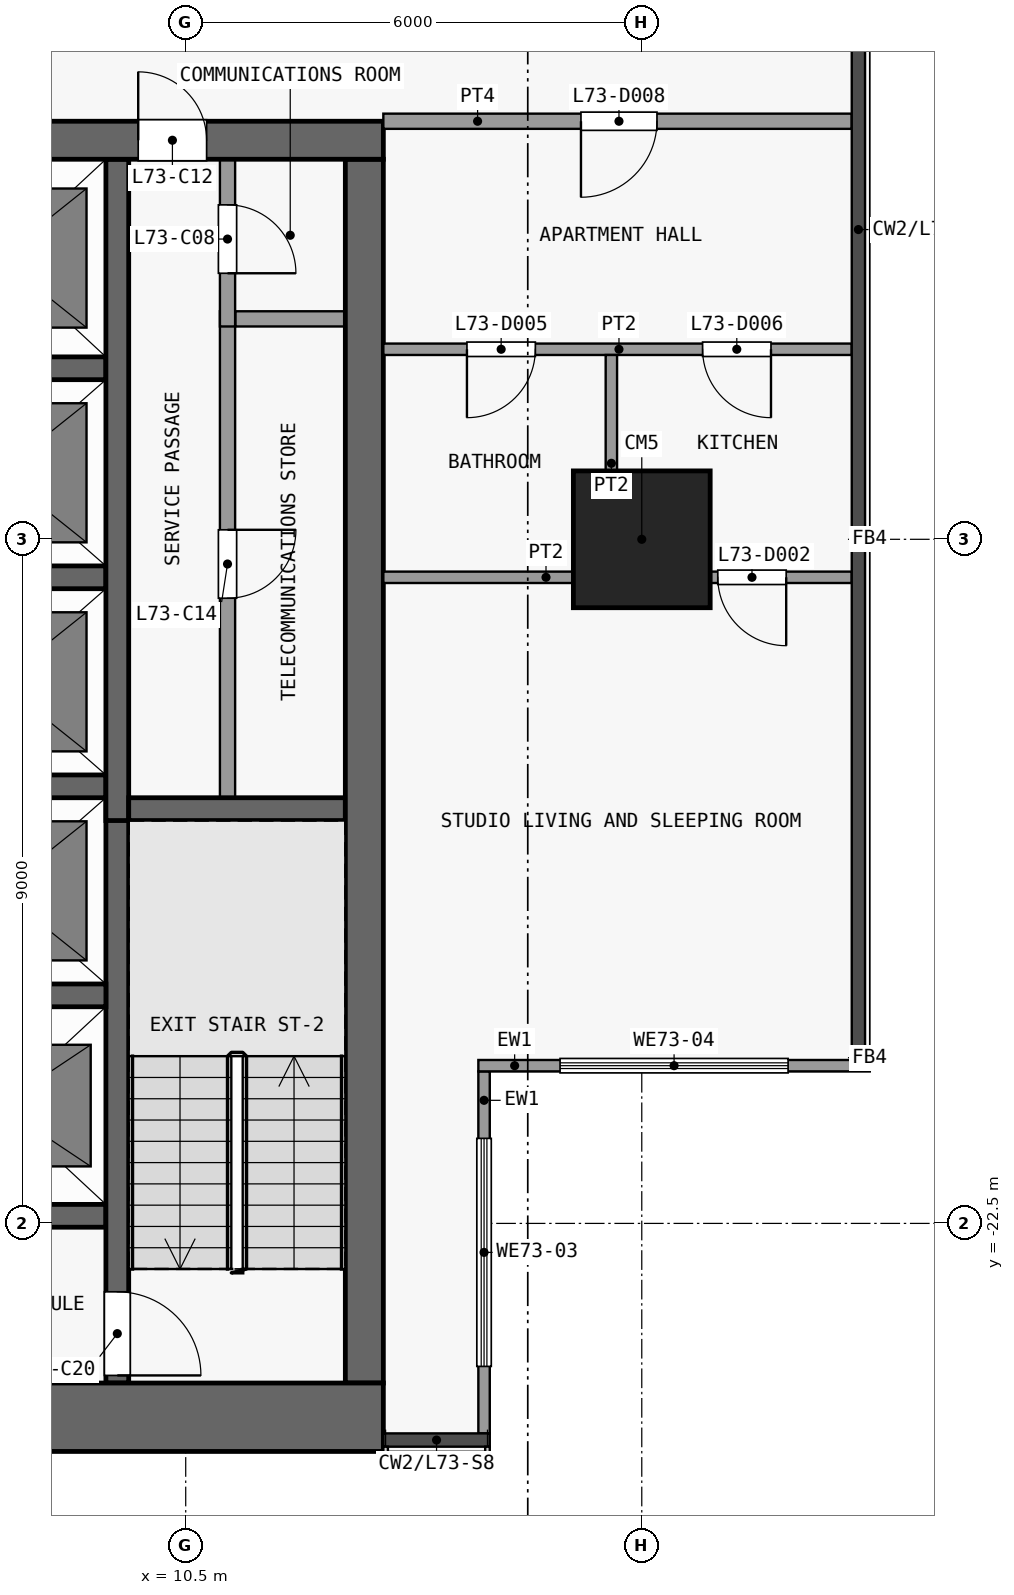
"""IFC4 building model, lengths in metres.
Left out: names, types, materials, properties, quantities, classifications, styles, units other than length and angle.
Written with IfcOpenShell. Run it as: python <this file> out.ifc"""

import sys

from ifc_helpers import new_model, si_unit, direction, frame, frame_2d, origin, origin_2d, place, context, subcontext, project, spatial, rectangle, extrude, element, fill, save


model = new_model("IFC4")
c1 = context("Model", 3, precision=1e-05, world=origin(), true_north=direction((0.0, 1.0)))
c2 = subcontext(c1, "Body", "Model", "MODEL_VIEW")
j1 = project(units=[si_unit("LENGTHUNIT", "METRE"), si_unit("PLANEANGLEUNIT", "RADIAN")], contexts=[c1])
p1 = place(None, origin())
s1 = spatial("IfcSite", under=j1, at=p1, CompositionType="ELEMENT")
p2 = place(p1, origin())
s2 = spatial("IfcBuilding", under=s1, at=p2, CompositionType="ELEMENT")
p3 = place(p2, frame((0.0, 0.0, 287.9)))
s3 = spatial("IfcBuildingStorey", under=s2, at=p3, CompositionType="ELEMENT", Elevation=287.9)
p4 = place(p3, frame((16.5, -13.5, 0.0), z_axis=(0.0, 0.0, 1.0), x_axis=(1.0, 0.0, 0.0)))
e1 = element("IfcColumn", 1, at=p4, inside=s3, PredefinedType="COLUMN", context=c2, shape_type="SweptSolid", body=[
    extrude(rectangle(XDim=1.8, YDim=1.8, at=origin_2d()), origin(), (0.0, 0.0, 1.0), 3.6),
])
p5 = place(p3, frame((-13.1, -25.05, 0.0), z_axis=(0.0, 0.0, 1.0), x_axis=(1.0, 0.0, 0.0)))
e2 = element("IfcWall", 2, at=p5, inside=s3, PredefinedType="SHEAR", context=c2, shape_type="SweptSolid", body=[
    extrude(rectangle(XDim=26.2, YDim=0.9, at=frame_2d((13.1, 0.0))), origin(), (0.0, 0.0, 1.0), 3.3),
])
p6 = place(p3, frame((-13.1, -8.25, 0.0), z_axis=(0.0, 0.0, 1.0), x_axis=(1.0, 0.0, 0.0)))
e3 = element("IfcWall", 3, at=p6, inside=s3, PredefinedType="SHEAR", context=c2, shape_type="SweptSolid", body=[
    extrude(rectangle(XDim=26.2, YDim=0.5, at=frame_2d((13.1, 0.0))), origin(), (0.0, 0.0, 1.0), 3.3),
])
p7 = place(p6, frame((7.4, 0.0, 0.0)))
e4 = element("IfcOpeningElement", 4, at=p7, cuts=e3, PredefinedType="OPENING", context=c2, shape_type="SweptSolid", body=[
    extrude(rectangle(XDim=1.8, YDim=2.1, at=frame_2d((0.9, 1.05))), frame((0.0, 0.26, 0.0), z_axis=(0.0, -1.0, 0.0), x_axis=(1.0, 0.0, 0.0)), (0.0, 0.0, 1.0), 0.52),
])
p8 = place(p6, frame((17.0, 0.0, 0.0)))
e5 = element("IfcOpeningElement", 5, at=p8, cuts=e3, PredefinedType="OPENING", context=c2, shape_type="SweptSolid", body=[
    extrude(rectangle(XDim=1.8, YDim=2.1, at=frame_2d((0.9, 1.05))), frame((0.0, 0.26, 0.0), z_axis=(0.0, -1.0, 0.0), x_axis=(1.0, 0.0, 0.0)), (0.0, 0.0, 1.0), 0.52),
])
p9 = place(p6, frame((2.325, 0.0, 0.0)))
e6 = element("IfcOpeningElement", 6, at=p9, cuts=e3, PredefinedType="OPENING", context=c2, shape_type="SweptSolid", body=[
    extrude(rectangle(XDim=0.9, YDim=2.1, at=frame_2d((0.45, 1.05))), frame((0.0, 0.26, 0.0), z_axis=(0.0, -1.0, 0.0), x_axis=(1.0, 0.0, 0.0)), (0.0, 0.0, 1.0), 0.52),
])
p10 = place(p6, frame((22.975, 0.0, 0.0)))
e7 = element("IfcOpeningElement", 7, at=p10, cuts=e3, PredefinedType="OPENING", context=c2, shape_type="SweptSolid", body=[
    extrude(rectangle(XDim=0.9, YDim=2.1, at=frame_2d((0.45, 1.05))), frame((0.0, 0.26, 0.0), z_axis=(0.0, -1.0, 0.0), x_axis=(1.0, 0.0, 0.0)), (0.0, 0.0, 1.0), 0.52),
])
p11 = place(p3, frame((12.85, -24.6, 0.0), z_axis=(0.0, 0.0, 1.0), x_axis=(0.0, 1.0, 0.0)))
e8 = element("IfcWall", 8, at=p11, inside=s3, PredefinedType="SHEAR", context=c2, shape_type="SweptSolid", body=[
    extrude(rectangle(XDim=16.1, YDim=0.5, at=frame_2d((8.05, 0.0))), origin(), (0.0, 0.0, 1.0), 3.3),
])
for number, where, z_axis, x_axis in (
    (9, (6.65, -22.4, 0.0), (0.0, 0.0, 1.0), (1.0, 0.0, 0.0)),
    (10, (6.65, -19.5, 0.0), (0.0, 0.0, 1.0), (1.0, 0.0, 0.0)),
):
    element("IfcWall", number, at=place(p3, frame(where, z_axis=z_axis, x_axis=x_axis)), inside=s3, PredefinedType="SHEAR", context=c2, shape_type="SweptSolid", body=[
        extrude(rectangle(XDim=2.8, YDim=0.3, at=frame_2d((1.4, 0.0))), origin(), (0.0, 0.0, 1.0), 3.3),
    ])
p12 = place(p3, frame((9.75, -17.05, 0.0), z_axis=(0.0, 0.0, 1.0), x_axis=(1.0, 0.0, 0.0)))
e11 = element("IfcWall", 11, at=p12, inside=s3, PredefinedType="SHEAR", context=c2, shape_type="SweptSolid", body=[
    extrude(rectangle(XDim=2.85, YDim=0.3, at=frame_2d((1.425, 0.0))), origin(), (0.0, 0.0, 1.0), 3.3),
])
for number, where, z_axis, x_axis in (
    (12, (6.65, -16.75, 0.0), (0.0, 0.0, 1.0), (1.0, 0.0, 0.0)),
    (13, (6.65, -14.0, 0.0), (0.0, 0.0, 1.0), (1.0, 0.0, 0.0)),
    (14, (6.65, -11.25, 0.0), (0.0, 0.0, 1.0), (1.0, 0.0, 0.0)),
):
    element("IfcWall", number, at=place(p3, frame(where, z_axis=z_axis, x_axis=x_axis)), inside=s3, PredefinedType="SHEAR", context=c2, shape_type="SweptSolid", body=[
        extrude(rectangle(XDim=2.8, YDim=0.3, at=frame_2d((1.4, 0.0))), origin(), (0.0, 0.0, 1.0), 3.3),
    ])
p13 = place(p3, frame((11.15, -10.6, 0.0), z_axis=(0.0, 0.0, 1.0), x_axis=(1.0, 0.0, 0.0)))
e15 = element("IfcWall", 15, at=p13, inside=s3, PredefinedType="PARTITIONING", context=c2, shape_type="SweptSolid", body=[
    extrude(rectangle(XDim=1.45, YDim=0.2, at=frame_2d((0.725, 0.0))), origin(), (0.0, 0.0, 1.0), 3.3),
])
p14 = place(p3, frame((9.6, -16.9, 0.0), z_axis=(0.0, 0.0, 1.0), x_axis=(0.0, -1.0, 0.0)))
e16 = element("IfcWall", 16, at=p14, inside=s3, PredefinedType="SHEAR", context=c2, shape_type="SweptSolid", body=[
    extrude(rectangle(XDim=7.7, YDim=0.3, at=frame_2d((3.85, 0.0))), origin(), (0.0, 0.0, 1.0), 3.3),
])
p15 = place(p14, frame((6.5, 0.0, 0.0)))
e17 = element("IfcOpeningElement", 17, at=p15, cuts=e16, PredefinedType="OPENING", context=c2, shape_type="SweptSolid", body=[
    extrude(rectangle(XDim=1.1, YDim=2.1, at=frame_2d((0.55, 1.05))), frame((0.0, 0.16, 0.0), z_axis=(0.0, -1.0, 0.0), x_axis=(1.0, 0.0, 0.0)), (0.0, 0.0, 1.0), 0.32),
])
p16 = place(p3, frame((9.6, -17.2, 0.0), z_axis=(0.0, 0.0, 1.0), x_axis=(0.0, 1.0, 0.0)))
e18 = element("IfcWall", 18, at=p16, inside=s3, PredefinedType="SHEAR", context=c2, shape_type="SweptSolid", body=[
    extrude(rectangle(XDim=8.7, YDim=0.3, at=frame_2d((4.35, 0.0))), origin(), (0.0, 0.0, 1.0), 3.3),
])
p17 = place(p3, frame((11.05, -10.5, 0.0), z_axis=(0.0, 0.0, 1.0), x_axis=(0.0, -1.0, 0.0)))
e19 = element("IfcWall", 19, at=p17, inside=s3, PredefinedType="PARTITIONING", context=c2, shape_type="SweptSolid", body=[
    extrude(rectangle(XDim=6.4, YDim=0.2, at=frame_2d((3.2, 0.0))), origin(), (0.0, 0.0, 1.0), 3.3),
])
p18 = place(p17, frame((2.875, 0.0, 0.0)))
e20 = element("IfcOpeningElement", 20, at=p18, cuts=e19, PredefinedType="OPENING", context=c2, shape_type="SweptSolid", body=[
    extrude(rectangle(XDim=0.9, YDim=2.1, at=frame_2d((0.45, 1.05))), frame((0.0, 0.11, 0.0), z_axis=(0.0, -1.0, 0.0), x_axis=(1.0, 0.0, 0.0)), (0.0, 0.0, 1.0), 0.22),
])
p19 = place(p3, frame((11.05, -8.5, 0.0), z_axis=(0.0, 0.0, 1.0), x_axis=(0.0, -1.0, 0.0)))
e21 = element("IfcWall", 21, at=p19, inside=s3, PredefinedType="PARTITIONING", context=c2, shape_type="SweptSolid", body=[
    extrude(rectangle(XDim=2.2, YDim=0.2, at=frame_2d((1.1, 0.0))), origin(), (0.0, 0.0, 1.0), 3.3),
])
p20 = place(p19, frame((0.6, 0.0, 0.0)))
e22 = element("IfcOpeningElement", 22, at=p20, cuts=e21, PredefinedType="OPENING", context=c2, shape_type="SweptSolid", body=[
    extrude(rectangle(XDim=0.9, YDim=2.1, at=frame_2d((0.45, 1.05))), frame((0.0, 0.11, 0.0), z_axis=(0.0, -1.0, 0.0), x_axis=(1.0, 0.0, 0.0)), (0.0, 0.0, 1.0), 0.22),
])
p21 = place(p3, frame((14.425, -20.5, 0.0), z_axis=(0.0, 0.0, 1.0), x_axis=(0.0, -1.0, 0.0)))
e23 = element("IfcWall", 23, at=p21, inside=s3, PredefinedType="SOLIDWALL", context=c2, shape_type="SweptSolid", body=[
    extrude(rectangle(XDim=4.762, YDim=0.15, at=frame_2d((2.381, 0.0))), origin(), (0.0, 0.0, 1.0), 3.3),
])
p22 = place(p21, frame((0.881, 0.0, 0.9)))
e24 = element("IfcOpeningElement", 24, at=p22, cuts=e23, PredefinedType="OPENING", context=c2, shape_type="SweptSolid", body=[
    extrude(rectangle(XDim=3.0, YDim=2.4, at=frame_2d((1.5, 1.2))), frame((0.0, 0.085, 0.0), z_axis=(0.0, -1.0, 0.0), x_axis=(1.0, 0.0, 0.0)), (0.0, 0.0, 1.0), 0.17),
])
p23 = place(p3, frame((19.5, -20.425, 0.0), z_axis=(0.0, 0.0, 1.0), x_axis=(-1.0, 0.0, 0.0)))
e25 = element("IfcWall", 25, at=p23, inside=s3, PredefinedType="SOLIDWALL", context=c2, shape_type="SweptSolid", body=[
    extrude(rectangle(XDim=5.15, YDim=0.15, at=frame_2d((2.575, 0.0))), origin(), (0.0, 0.0, 1.0), 3.3),
])
p24 = place(p23, frame((1.075, 0.0, 0.9)))
e26 = element("IfcOpeningElement", 26, at=p24, cuts=e25, PredefinedType="OPENING", context=c2, shape_type="SweptSolid", body=[
    extrude(rectangle(XDim=3.0, YDim=2.4, at=frame_2d((1.5, 1.2))), frame((0.0, 0.085, 0.0), z_axis=(0.0, -1.0, 0.0), x_axis=(1.0, 0.0, 0.0)), (0.0, 0.0, 1.0), 0.17),
])
p25 = place(p3, frame((13.1, -14.0, 0.0), z_axis=(0.0, 0.0, 1.0), x_axis=(1.0, 0.0, 0.0)))
e27 = element("IfcWall", 27, at=p25, inside=s3, PredefinedType="PARTITIONING", context=c2, shape_type="SweptSolid", body=[
    extrude(rectangle(XDim=6.162, YDim=0.15, at=frame_2d((3.081, 0.0))), origin(), (0.0, 0.0, 1.0), 3.3),
])
p26 = place(p25, frame((4.4, 0.0, 0.0)))
e28 = element("IfcOpeningElement", 28, at=p26, cuts=e27, PredefinedType="OPENING", context=c2, shape_type="SweptSolid", body=[
    extrude(rectangle(XDim=0.9, YDim=2.1, at=frame_2d((0.45, 1.05))), frame((0.0, 0.085, 0.0), z_axis=(0.0, -1.0, 0.0), x_axis=(1.0, 0.0, 0.0)), (0.0, 0.0, 1.0), 0.17),
])
p27 = place(p3, frame((13.1, -11.0, 0.0), z_axis=(0.0, 0.0, 1.0), x_axis=(1.0, 0.0, 0.0)))
e29 = element("IfcWall", 29, at=p27, inside=s3, PredefinedType="PARTITIONING", context=c2, shape_type="SweptSolid", body=[
    extrude(rectangle(XDim=6.162, YDim=0.15, at=frame_2d((3.081, 0.0))), origin(), (0.0, 0.0, 1.0), 3.3),
])
p28 = place(p27, frame((1.1, 0.0, 0.0)))
e30 = element("IfcOpeningElement", 30, at=p28, cuts=e29, PredefinedType="OPENING", context=c2, shape_type="SweptSolid", body=[
    extrude(rectangle(XDim=0.9, YDim=2.1, at=frame_2d((0.45, 1.05))), frame((0.0, 0.085, 0.0), z_axis=(0.0, -1.0, 0.0), x_axis=(1.0, 0.0, 0.0)), (0.0, 0.0, 1.0), 0.17),
])
p29 = place(p27, frame((4.2, 0.0, 0.0)))
e31 = element("IfcOpeningElement", 31, at=p29, cuts=e29, PredefinedType="OPENING", context=c2, shape_type="SweptSolid", body=[
    extrude(rectangle(XDim=0.9, YDim=2.1, at=frame_2d((0.45, 1.05))), frame((0.0, 0.085, 0.0), z_axis=(0.0, -1.0, 0.0), x_axis=(1.0, 0.0, 0.0)), (0.0, 0.0, 1.0), 0.17),
])
p30 = place(p3, frame((13.1, -8.0, 0.0), z_axis=(0.0, 0.0, 1.0), x_axis=(1.0, 0.0, 0.0)))
e32 = element("IfcWall", 32, at=p30, inside=s3, PredefinedType="PARTITIONING", context=c2, shape_type="SweptSolid", body=[
    extrude(rectangle(XDim=6.162, YDim=0.2, at=frame_2d((3.081, 0.0))), origin(), (0.0, 0.0, 1.0), 3.3),
])
p31 = place(p30, frame((2.6, 0.0, 0.0)))
e33 = element("IfcOpeningElement", 33, at=p31, cuts=e32, PredefinedType="OPENING", context=c2, shape_type="SweptSolid", body=[
    extrude(rectangle(XDim=1.0, YDim=2.1, at=frame_2d((0.5, 1.05))), frame((0.0, 0.11, 0.0), z_axis=(0.0, -1.0, 0.0), x_axis=(1.0, 0.0, 0.0)), (0.0, 0.0, 1.0), 0.22),
])
p32 = place(p3, frame((16.1, -13.925, 0.0), z_axis=(0.0, 0.0, 1.0), x_axis=(0.0, 1.0, 0.0)))
e34 = element("IfcWall", 34, at=p32, inside=s3, PredefinedType="PARTITIONING", context=c2, shape_type="SweptSolid", body=[
    extrude(rectangle(XDim=2.85, YDim=0.15, at=frame_2d((1.425, 0.0))), origin(), (0.0, 0.0, 1.0), 3.3),
])
p33 = place(p20, origin())
e35 = element("IfcDoor", 35, at=p33, inside=s3, OperationType="SINGLE_SWING_RIGHT", PredefinedType="DOOR", context=c2, shape_type="SweptSolid", body=[
    extrude(rectangle(XDim=0.9, YDim=2.1, at=frame_2d((0.45, 1.05))), frame((0.0, 0.025, 0.0), z_axis=(0.0, -1.0, 0.0), x_axis=(1.0, 0.0, 0.0)), (0.0, 0.0, 1.0), 0.05),
])
fill(e22, e35)
p34 = place(p10, origin())
e36 = element("IfcDoor", 36, at=p34, inside=s3, OperationType="SINGLE_SWING_LEFT", PredefinedType="DOOR", context=c2, shape_type="SweptSolid", body=[
    extrude(rectangle(XDim=0.9, YDim=2.1, at=frame_2d((0.45, 1.05))), frame((0.0, 0.025, 0.0), z_axis=(0.0, -1.0, 0.0), x_axis=(1.0, 0.0, 0.0)), (0.0, 0.0, 1.0), 0.05),
])
fill(e7, e36)
p35 = place(p18, origin())
e37 = element("IfcDoor", 37, at=p35, inside=s3, OperationType="SINGLE_SWING_LEFT", PredefinedType="DOOR", context=c2, shape_type="SweptSolid", body=[
    extrude(rectangle(XDim=0.9, YDim=2.1, at=frame_2d((0.45, 1.05))), frame((0.0, 0.025, 0.0), z_axis=(0.0, -1.0, 0.0), x_axis=(1.0, 0.0, 0.0)), (0.0, 0.0, 1.0), 0.05),
])
fill(e20, e37)
p36 = place(p15, origin())
e38 = element("IfcDoor", 38, at=p36, inside=s3, OperationType="SINGLE_SWING_RIGHT", PredefinedType="DOOR", context=c2, shape_type="SweptSolid", body=[
    extrude(rectangle(XDim=1.1, YDim=2.1, at=frame_2d((0.55, 1.05))), frame((0.0, 0.025, 0.0), z_axis=(0.0, -1.0, 0.0), x_axis=(1.0, 0.0, 0.0)), (0.0, 0.0, 1.0), 0.05),
])
fill(e17, e38)
p37 = place(p22, origin())
e39 = element("IfcWindow", 39, at=p37, inside=s3, PartitioningType="SINGLE_PANEL", PredefinedType="WINDOW", context=c2, shape_type="SweptSolid", body=[
    extrude(rectangle(XDim=3.0, YDim=2.4, at=frame_2d((1.5, 1.2))), frame((0.0, 0.03, 0.0), z_axis=(0.0, -1.0, 0.0), x_axis=(1.0, 0.0, 0.0)), (0.0, 0.0, 1.0), 0.06),
])
fill(e24, e39)
p38 = place(p24, origin())
e40 = element("IfcWindow", 40, at=p38, inside=s3, PartitioningType="SINGLE_PANEL", PredefinedType="WINDOW", context=c2, shape_type="SweptSolid", body=[
    extrude(rectangle(XDim=3.0, YDim=2.4, at=frame_2d((1.5, 1.2))), frame((0.0, 0.03, 0.0), z_axis=(0.0, -1.0, 0.0), x_axis=(1.0, 0.0, 0.0)), (0.0, 0.0, 1.0), 0.06),
])
fill(e26, e40)
p39 = place(p26, origin())
e41 = element("IfcDoor", 41, at=p39, inside=s3, OperationType="SINGLE_SWING_RIGHT", PredefinedType="DOOR", context=c2, shape_type="SweptSolid", body=[
    extrude(rectangle(XDim=0.9, YDim=2.1, at=frame_2d((0.45, 1.05))), frame((0.0, 0.025, 0.0), z_axis=(0.0, -1.0, 0.0), x_axis=(1.0, 0.0, 0.0)), (0.0, 0.0, 1.0), 0.05),
])
fill(e28, e41)
p40 = place(p28, origin())
e42 = element("IfcDoor", 42, at=p40, inside=s3, OperationType="SINGLE_SWING_LEFT", PredefinedType="DOOR", context=c2, shape_type="SweptSolid", body=[
    extrude(rectangle(XDim=0.9, YDim=2.1, at=frame_2d((0.45, 1.05))), frame((0.0, 0.025, 0.0), z_axis=(0.0, -1.0, 0.0), x_axis=(1.0, 0.0, 0.0)), (0.0, 0.0, 1.0), 0.05),
])
fill(e30, e42)
p41 = place(p29, origin())
e43 = element("IfcDoor", 43, at=p41, inside=s3, OperationType="SINGLE_SWING_RIGHT", PredefinedType="DOOR", context=c2, shape_type="SweptSolid", body=[
    extrude(rectangle(XDim=0.9, YDim=2.1, at=frame_2d((0.45, 1.05))), frame((0.0, 0.025, 0.0), z_axis=(0.0, -1.0, 0.0), x_axis=(1.0, 0.0, 0.0)), (0.0, 0.0, 1.0), 0.05),
])
fill(e31, e43)
p42 = place(p31, origin())
e44 = element("IfcDoor", 44, at=p42, inside=s3, OperationType="SINGLE_SWING_LEFT", PredefinedType="DOOR", context=c2, shape_type="SweptSolid", body=[
    extrude(rectangle(XDim=1.0, YDim=2.1, at=frame_2d((0.5, 1.05))), frame((0.0, 0.025, 0.0), z_axis=(0.0, -1.0, 0.0), x_axis=(1.0, 0.0, 0.0)), (0.0, 0.0, 1.0), 0.05),
])
fill(e33, e44)
save(model, sys.argv[1])
